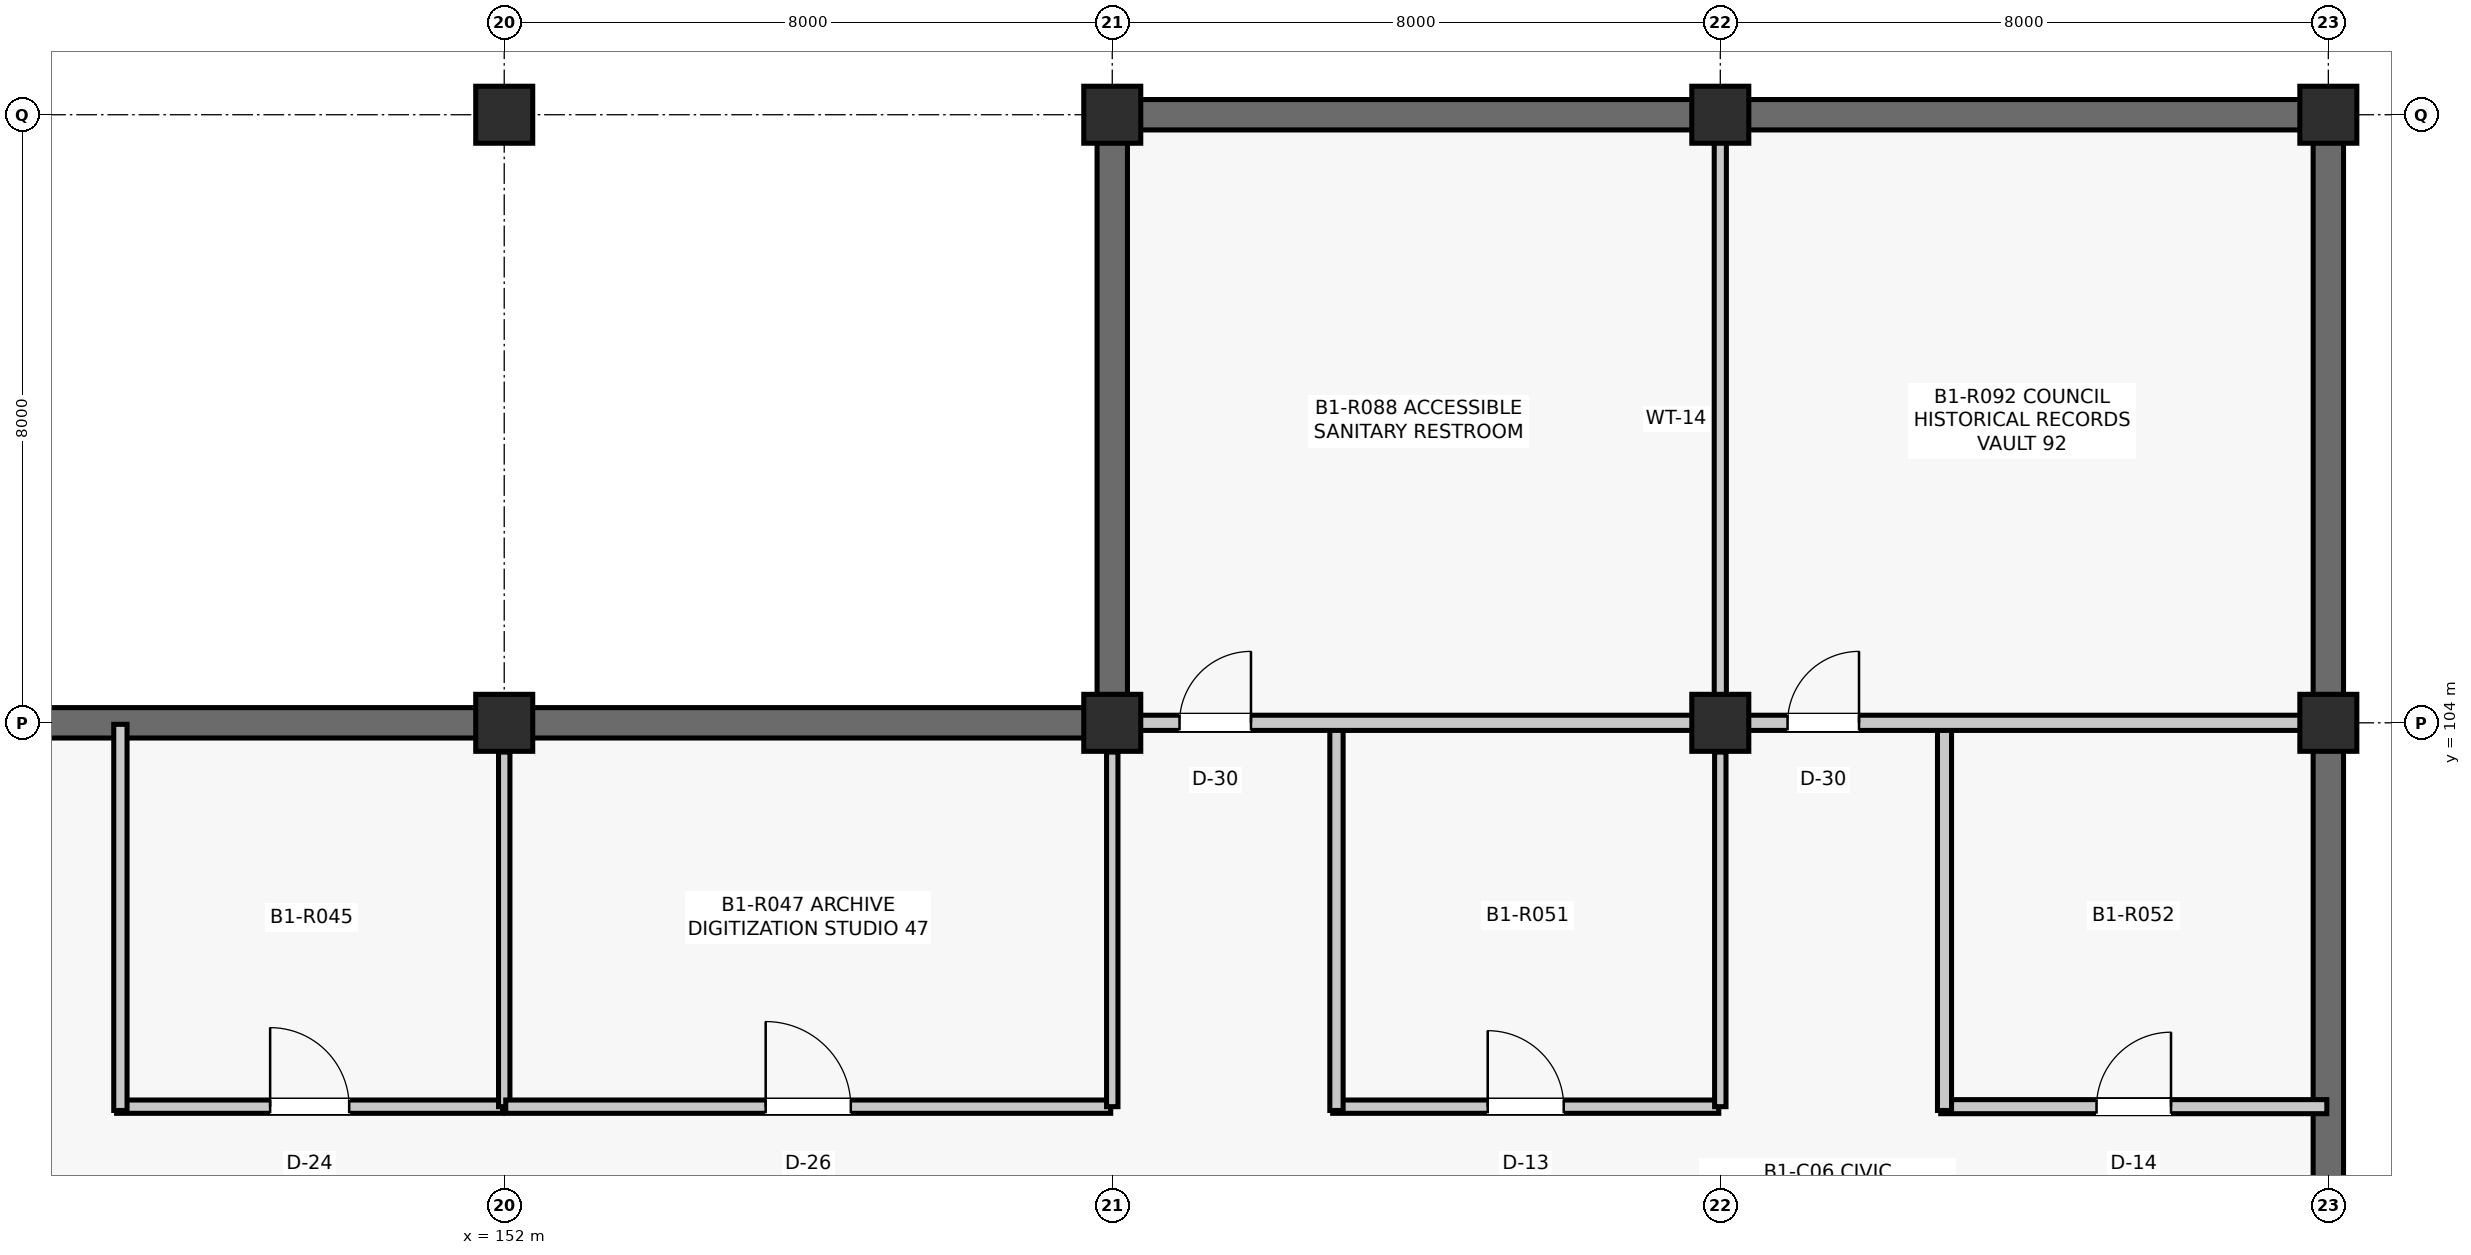
"""IFC4 building model, lengths in metres.
Left out: names, types, materials, properties, quantities, classifications, styles, units other than length and angle.
Written with IfcOpenShell. Run it as: python <this file> out.ifc"""

import sys

from ifc_helpers import new_model, si_unit, direction, frame, frame_2d, origin, origin_2d, place, context, subcontext, project, spatial, rectangle, extrude, element, fill, save


model = new_model("IFC4")
c1 = context("Model", 3, precision=1e-05, world=origin(), true_north=direction((0.0, 1.0)))
c2 = subcontext(c1, "Body", "Model", "MODEL_VIEW")
j1 = project(units=[si_unit("LENGTHUNIT", "METRE"), si_unit("PLANEANGLEUNIT", "RADIAN")], contexts=[c1])
p1 = place(None, origin())
s1 = spatial("IfcSite", under=j1, at=p1, CompositionType="ELEMENT")
p2 = place(p1, origin())
s2 = spatial("IfcBuilding", under=s1, at=p2, CompositionType="ELEMENT")
p3 = place(p2, frame((0.0, 0.0, -4.29)))
s3 = spatial("IfcBuildingStorey", under=s2, at=p3, CompositionType="ELEMENT", Elevation=-4.29)
for number, where, z_axis, x_axis in (
    (1, (152.0, 104.0, 0.0), (0.0, 0.0, 1.0), (1.0, 0.0, 0.0)),
    (2, (152.0, 112.0, 0.0), (0.0, 0.0, 1.0), (1.0, 0.0, 0.0)),
    (3, (160.0, 104.0, 0.0), (0.0, 0.0, 1.0), (1.0, 0.0, 0.0)),
    (4, (160.0, 112.0, 0.0), (0.0, 0.0, 1.0), (1.0, 0.0, 0.0)),
    (5, (168.0, 104.0, 0.0), (0.0, 0.0, 1.0), (1.0, 0.0, 0.0)),
    (6, (168.0, 112.0, 0.0), (0.0, 0.0, 1.0), (1.0, 0.0, 0.0)),
    (7, (176.0, 104.0, 0.0), (0.0, 0.0, 1.0), (1.0, 0.0, 0.0)),
    (8, (176.0, 112.0, 0.0), (0.0, 0.0, 1.0), (1.0, 0.0, 0.0)),
):
    element("IfcColumn", number, at=place(p3, frame(where, z_axis=z_axis, x_axis=x_axis)), inside=s3, PredefinedType="COLUMN", context=c2, shape_type="SweptSolid", body=[
        extrude(rectangle(XDim=0.75, YDim=0.75, at=origin_2d()), origin(), (0.0, 0.0, 1.0), 4.29),
    ])
p4 = place(p3, frame((144.385, 104.0, 0.0), z_axis=(0.0, 0.0, 1.0), x_axis=(1.0, 0.0, 0.0)))
e9 = element("IfcWall", 9, at=p4, inside=s3, PredefinedType="SHEAR", context=c2, shape_type="SweptSolid", body=[
    extrude(rectangle(XDim=7.255, YDim=0.4, at=frame_2d((3.627, 0.0))), origin(), (0.0, 0.0, 1.0), 3.391),
])
p5 = place(p3, frame((152.36, 104.0, 0.0), z_axis=(0.0, 0.0, 1.0), x_axis=(1.0, 0.0, 0.0)))
e10 = element("IfcWall", 10, at=p5, inside=s3, PredefinedType="SHEAR", context=c2, shape_type="SweptSolid", body=[
    extrude(rectangle(XDim=7.28, YDim=0.4, at=frame_2d((3.64, 0.0))), origin(), (0.0, 0.0, 1.0), 3.314),
])
p6 = place(p3, frame((160.36, 112.0, 0.0), z_axis=(0.0, 0.0, 1.0), x_axis=(1.0, 0.0, 0.0)))
e11 = element("IfcWall", 11, at=p6, inside=s3, PredefinedType="SHEAR", context=c2, shape_type="SweptSolid", body=[
    extrude(rectangle(XDim=7.28, YDim=0.4, at=frame_2d((3.64, 0.0))), origin(), (0.0, 0.0, 1.0), 3.654),
])
p7 = place(p3, frame((160.0, 104.36, 0.0), z_axis=(0.0, 0.0, 1.0), x_axis=(0.0, 1.0, 0.0)))
e12 = element("IfcWall", 12, at=p7, inside=s3, PredefinedType="SHEAR", context=c2, shape_type="SweptSolid", body=[
    extrude(rectangle(XDim=7.28, YDim=0.4, at=frame_2d((3.64, 0.0))), origin(), (0.0, 0.0, 1.0), 3.399),
])
p8 = place(p3, frame((176.0, 96.36, 0.0), z_axis=(0.0, 0.0, 1.0), x_axis=(0.0, 1.0, 0.0)))
e13 = element("IfcWall", 13, at=p8, inside=s3, PredefinedType="SHEAR", context=c2, shape_type="SweptSolid", body=[
    extrude(rectangle(XDim=7.28, YDim=0.4, at=frame_2d((3.64, 0.0))), origin(), (0.0, 0.0, 1.0), 3.654),
])
for number, where, z_axis, x_axis in (
    (14, (168.36, 112.0, 0.0), (0.0, 0.0, 1.0), (1.0, 0.0, 0.0)),
    (15, (176.0, 104.36, 0.0), (0.0, 0.0, 1.0), (0.0, 1.0, 0.0)),
):
    element("IfcWall", number, at=place(p3, frame(where, z_axis=z_axis, x_axis=x_axis)), inside=s3, PredefinedType="SHEAR", context=c2, shape_type="SweptSolid", body=[
        extrude(rectangle(XDim=7.28, YDim=0.4, at=frame_2d((3.64, 0.0))), origin(), (0.0, 0.0, 1.0), 3.594),
    ])
p9 = place(p3, frame((146.9, 98.95, 0.0), z_axis=(0.0, 0.0, 1.0), x_axis=(1.0, 0.0, 0.0)))
e16 = element("IfcWall", 16, at=p9, inside=s3, PredefinedType="PARTITIONING", context=c2, shape_type="SweptSolid", body=[
    extrude(rectangle(XDim=5.08, YDim=0.175, at=frame_2d((2.54, 0.0))), origin(), (0.0, 0.0, 1.0), 3.451),
])
p10 = place(p9, frame((2.02, 0.0, 0.0)))
e17 = element("IfcOpeningElement", 17, at=p10, cuts=e16, PredefinedType="OPENING", context=c2, shape_type="SweptSolid", body=[
    extrude(rectangle(XDim=1.04, YDim=2.18, at=frame_2d((0.52, 1.09))), frame((0.0, 0.097, 0.0), z_axis=(0.0, -1.0, 0.0), x_axis=(1.0, 0.0, 0.0)), (0.0, 0.0, 1.0), 0.195),
])
p11 = place(p3, frame((146.95, 98.9, 0.0), z_axis=(0.0, 0.0, 1.0), x_axis=(0.0, 1.0, 0.0)))
e18 = element("IfcWall", 18, at=p11, inside=s3, PredefinedType="PARTITIONING", context=c2, shape_type="SweptSolid", body=[
    extrude(rectangle(XDim=5.08, YDim=0.175, at=frame_2d((2.54, 0.0))), origin(), (0.0, 0.0, 1.0), 3.384),
])
p12 = place(p3, frame((152.0, 98.95, 0.0), z_axis=(0.0, 0.0, 1.0), x_axis=(0.0, 1.0, 0.0)))
e19 = element("IfcWall", 19, at=p12, inside=s3, PredefinedType="PARTITIONING", context=c2, shape_type="SweptSolid", body=[
    extrude(rectangle(XDim=4.665, YDim=0.15, at=frame_2d((2.333, 0.0))), origin(), (0.0, 0.0, 1.0), 3.451),
])
p13 = place(p3, frame((152.02, 98.95, 0.0), z_axis=(0.0, 0.0, 1.0), x_axis=(1.0, 0.0, 0.0)))
e20 = element("IfcWall", 20, at=p13, inside=s3, PredefinedType="PARTITIONING", context=c2, shape_type="SweptSolid", body=[
    extrude(rectangle(XDim=7.96, YDim=0.175, at=frame_2d((3.98, 0.0))), origin(), (0.0, 0.0, 1.0), 3.383),
])
p14 = place(p13, frame((3.42, 0.0, 0.0)))
e21 = element("IfcOpeningElement", 21, at=p14, cuts=e20, PredefinedType="OPENING", context=c2, shape_type="SweptSolid", body=[
    extrude(rectangle(XDim=1.12, YDim=2.22, at=frame_2d((0.56, 1.11))), frame((0.0, 0.097, 0.0), z_axis=(0.0, -1.0, 0.0), x_axis=(1.0, 0.0, 0.0)), (0.0, 0.0, 1.0), 0.195),
])
p15 = place(p3, frame((160.0, 98.95, 0.0), z_axis=(0.0, 0.0, 1.0), x_axis=(0.0, 1.0, 0.0)))
e22 = element("IfcWall", 22, at=p15, inside=s3, PredefinedType="PARTITIONING", context=c2, shape_type="SweptSolid", body=[
    extrude(rectangle(XDim=4.665, YDim=0.15, at=frame_2d((2.333, 0.0))), origin(), (0.0, 0.0, 1.0), 3.383),
])
p16 = place(p3, frame((162.9, 98.95, 0.0), z_axis=(0.0, 0.0, 1.0), x_axis=(1.0, 0.0, 0.0)))
e23 = element("IfcWall", 23, at=p16, inside=s3, PredefinedType="PARTITIONING", context=c2, shape_type="SweptSolid", body=[
    extrude(rectangle(XDim=5.08, YDim=0.175, at=frame_2d((2.54, 0.0))), origin(), (0.0, 0.0, 1.0), 3.392),
])
p17 = place(p16, frame((2.04, 0.0, 0.0)))
e24 = element("IfcOpeningElement", 24, at=p17, cuts=e23, PredefinedType="OPENING", context=c2, shape_type="SweptSolid", body=[
    extrude(rectangle(XDim=1.0, YDim=2.15, at=frame_2d((0.5, 1.075))), frame((0.0, 0.097, 0.0), z_axis=(0.0, -1.0, 0.0), x_axis=(1.0, 0.0, 0.0)), (0.0, 0.0, 1.0), 0.195),
])
p18 = place(p3, frame((162.95, 98.9, 0.0), z_axis=(0.0, 0.0, 1.0), x_axis=(0.0, 1.0, 0.0)))
e25 = element("IfcWall", 25, at=p18, inside=s3, PredefinedType="PARTITIONING", context=c2, shape_type="SweptSolid", body=[
    extrude(rectangle(XDim=5.08, YDim=0.175, at=frame_2d((2.54, 0.0))), origin(), (0.0, 0.0, 1.0), 3.383),
])
p19 = place(p3, frame((168.0, 98.95, 0.0), z_axis=(0.0, 0.0, 1.0), x_axis=(0.0, 1.0, 0.0)))
e26 = element("IfcWall", 26, at=p19, inside=s3, PredefinedType="PARTITIONING", context=c2, shape_type="SweptSolid", body=[
    extrude(rectangle(XDim=4.665, YDim=0.15, at=frame_2d((2.333, 0.0))), origin(), (0.0, 0.0, 1.0), 3.392),
])
p20 = place(p3, frame((170.9, 98.95, 0.0), z_axis=(0.0, 0.0, 1.0), x_axis=(1.0, 0.0, 0.0)))
e27 = element("IfcWall", 27, at=p20, inside=s3, PredefinedType="PARTITIONING", context=c2, shape_type="SweptSolid", body=[
    extrude(rectangle(XDim=5.08, YDim=0.185, at=frame_2d((2.54, 0.0))), origin(), (0.0, 0.0, 1.0), 3.647),
])
p21 = place(p20, frame((2.05, 0.0, 0.0)))
e28 = element("IfcOpeningElement", 28, at=p21, cuts=e27, PredefinedType="OPENING", context=c2, shape_type="SweptSolid", body=[
    extrude(rectangle(XDim=0.98, YDim=2.15, at=frame_2d((0.49, 1.075))), frame((0.0, 0.103, 0.0), z_axis=(0.0, -1.0, 0.0), x_axis=(1.0, 0.0, 0.0)), (0.0, 0.0, 1.0), 0.205),
])
p22 = place(p3, frame((170.95, 98.9, 0.0), z_axis=(0.0, 0.0, 1.0), x_axis=(0.0, 1.0, 0.0)))
e29 = element("IfcWall", 29, at=p22, inside=s3, PredefinedType="PARTITIONING", context=c2, shape_type="SweptSolid", body=[
    extrude(rectangle(XDim=5.08, YDim=0.185, at=frame_2d((2.54, 0.0))), origin(), (0.0, 0.0, 1.0), 3.316),
])
p23 = place(p3, frame((160.365, 104.0, 0.0), z_axis=(0.0, 0.0, 1.0), x_axis=(1.0, 0.0, 0.0)))
e30 = element("IfcWall", 30, at=p23, inside=s3, PredefinedType="PARTITIONING", context=c2, shape_type="SweptSolid", body=[
    extrude(rectangle(XDim=7.27, YDim=0.2, at=frame_2d((3.635, 0.0))), origin(), (0.0, 0.0, 1.0), 3.383),
])
p24 = place(p23, frame((0.52, 0.0, 0.0)))
e31 = element("IfcOpeningElement", 31, at=p24, cuts=e30, PredefinedType="OPENING", context=c2, shape_type="SweptSolid", body=[
    extrude(rectangle(XDim=0.94, YDim=2.12, at=frame_2d((0.47, 1.06))), frame((0.0, 0.11, 0.0), z_axis=(0.0, -1.0, 0.0), x_axis=(1.0, 0.0, 0.0)), (0.0, 0.0, 1.0), 0.22),
])
p25 = place(p3, frame((168.0, 104.365, 0.0), z_axis=(0.0, 0.0, 1.0), x_axis=(0.0, 1.0, 0.0)))
e32 = element("IfcWall", 32, at=p25, inside=s3, PredefinedType="PARTITIONING", context=c2, shape_type="SweptSolid", body=[
    extrude(rectangle(XDim=7.27, YDim=0.16, at=frame_2d((3.635, 0.0))), origin(), (0.0, 0.0, 1.0), 3.384),
])
p26 = place(p3, frame((168.365, 104.0, 0.0), z_axis=(0.0, 0.0, 1.0), x_axis=(1.0, 0.0, 0.0)))
e33 = element("IfcWall", 33, at=p26, inside=s3, PredefinedType="PARTITIONING", context=c2, shape_type="SweptSolid", body=[
    extrude(rectangle(XDim=7.27, YDim=0.2, at=frame_2d((3.635, 0.0))), origin(), (0.0, 0.0, 1.0), 3.316),
])
p27 = place(p26, frame((0.52, 0.0, 0.0)))
e34 = element("IfcOpeningElement", 34, at=p27, cuts=e33, PredefinedType="OPENING", context=c2, shape_type="SweptSolid", body=[
    extrude(rectangle(XDim=0.94, YDim=2.12, at=frame_2d((0.47, 1.06))), frame((0.0, 0.11, 0.0), z_axis=(0.0, -1.0, 0.0), x_axis=(1.0, 0.0, 0.0)), (0.0, 0.0, 1.0), 0.22),
])
p28 = place(p10, origin())
e35 = element("IfcDoor", 35, at=p28, inside=s3, OperationType="SINGLE_SWING_LEFT", PredefinedType="DOOR", context=c2, shape_type="SweptSolid", body=[
    extrude(rectangle(XDim=1.04, YDim=2.18, at=frame_2d((0.52, 1.09))), frame((0.0, 0.025, 0.0), z_axis=(0.0, -1.0, 0.0), x_axis=(1.0, 0.0, 0.0)), (0.0, 0.0, 1.0), 0.05),
])
fill(e17, e35)
p29 = place(p14, origin())
e36 = element("IfcDoor", 36, at=p29, inside=s3, OperationType="SINGLE_SWING_LEFT", PredefinedType="DOOR", context=c2, shape_type="SweptSolid", body=[
    extrude(rectangle(XDim=1.12, YDim=2.22, at=frame_2d((0.56, 1.11))), frame((0.0, 0.025, 0.0), z_axis=(0.0, -1.0, 0.0), x_axis=(1.0, 0.0, 0.0)), (0.0, 0.0, 1.0), 0.05),
])
fill(e21, e36)
p30 = place(p17, origin())
e37 = element("IfcDoor", 37, at=p30, inside=s3, OperationType="SINGLE_SWING_LEFT", PredefinedType="DOOR", context=c2, shape_type="SweptSolid", body=[
    extrude(rectangle(XDim=1.0, YDim=2.15, at=frame_2d((0.5, 1.075))), frame((0.0, 0.025, 0.0), z_axis=(0.0, -1.0, 0.0), x_axis=(1.0, 0.0, 0.0)), (0.0, 0.0, 1.0), 0.05),
])
fill(e24, e37)
p31 = place(p21, origin())
e38 = element("IfcDoor", 38, at=p31, inside=s3, OperationType="SINGLE_SWING_RIGHT", PredefinedType="DOOR", context=c2, shape_type="SweptSolid", body=[
    extrude(rectangle(XDim=0.98, YDim=2.15, at=frame_2d((0.49, 1.075))), frame((0.0, 0.025, 0.0), z_axis=(0.0, -1.0, 0.0), x_axis=(1.0, 0.0, 0.0)), (0.0, 0.0, 1.0), 0.05),
])
fill(e28, e38)
p32 = place(p24, origin())
e39 = element("IfcDoor", 39, at=p32, inside=s3, OperationType="SINGLE_SWING_RIGHT", PredefinedType="DOOR", context=c2, shape_type="SweptSolid", body=[
    extrude(rectangle(XDim=0.94, YDim=2.12, at=frame_2d((0.47, 1.06))), frame((0.0, 0.025, 0.0), z_axis=(0.0, -1.0, 0.0), x_axis=(1.0, 0.0, 0.0)), (0.0, 0.0, 1.0), 0.05),
])
fill(e31, e39)
p33 = place(p27, origin())
e40 = element("IfcDoor", 40, at=p33, inside=s3, OperationType="SINGLE_SWING_RIGHT", PredefinedType="DOOR", context=c2, shape_type="SweptSolid", body=[
    extrude(rectangle(XDim=0.94, YDim=2.12, at=frame_2d((0.47, 1.06))), frame((0.0, 0.025, 0.0), z_axis=(0.0, -1.0, 0.0), x_axis=(1.0, 0.0, 0.0)), (0.0, 0.0, 1.0), 0.05),
])
fill(e34, e40)
save(model, sys.argv[1])
